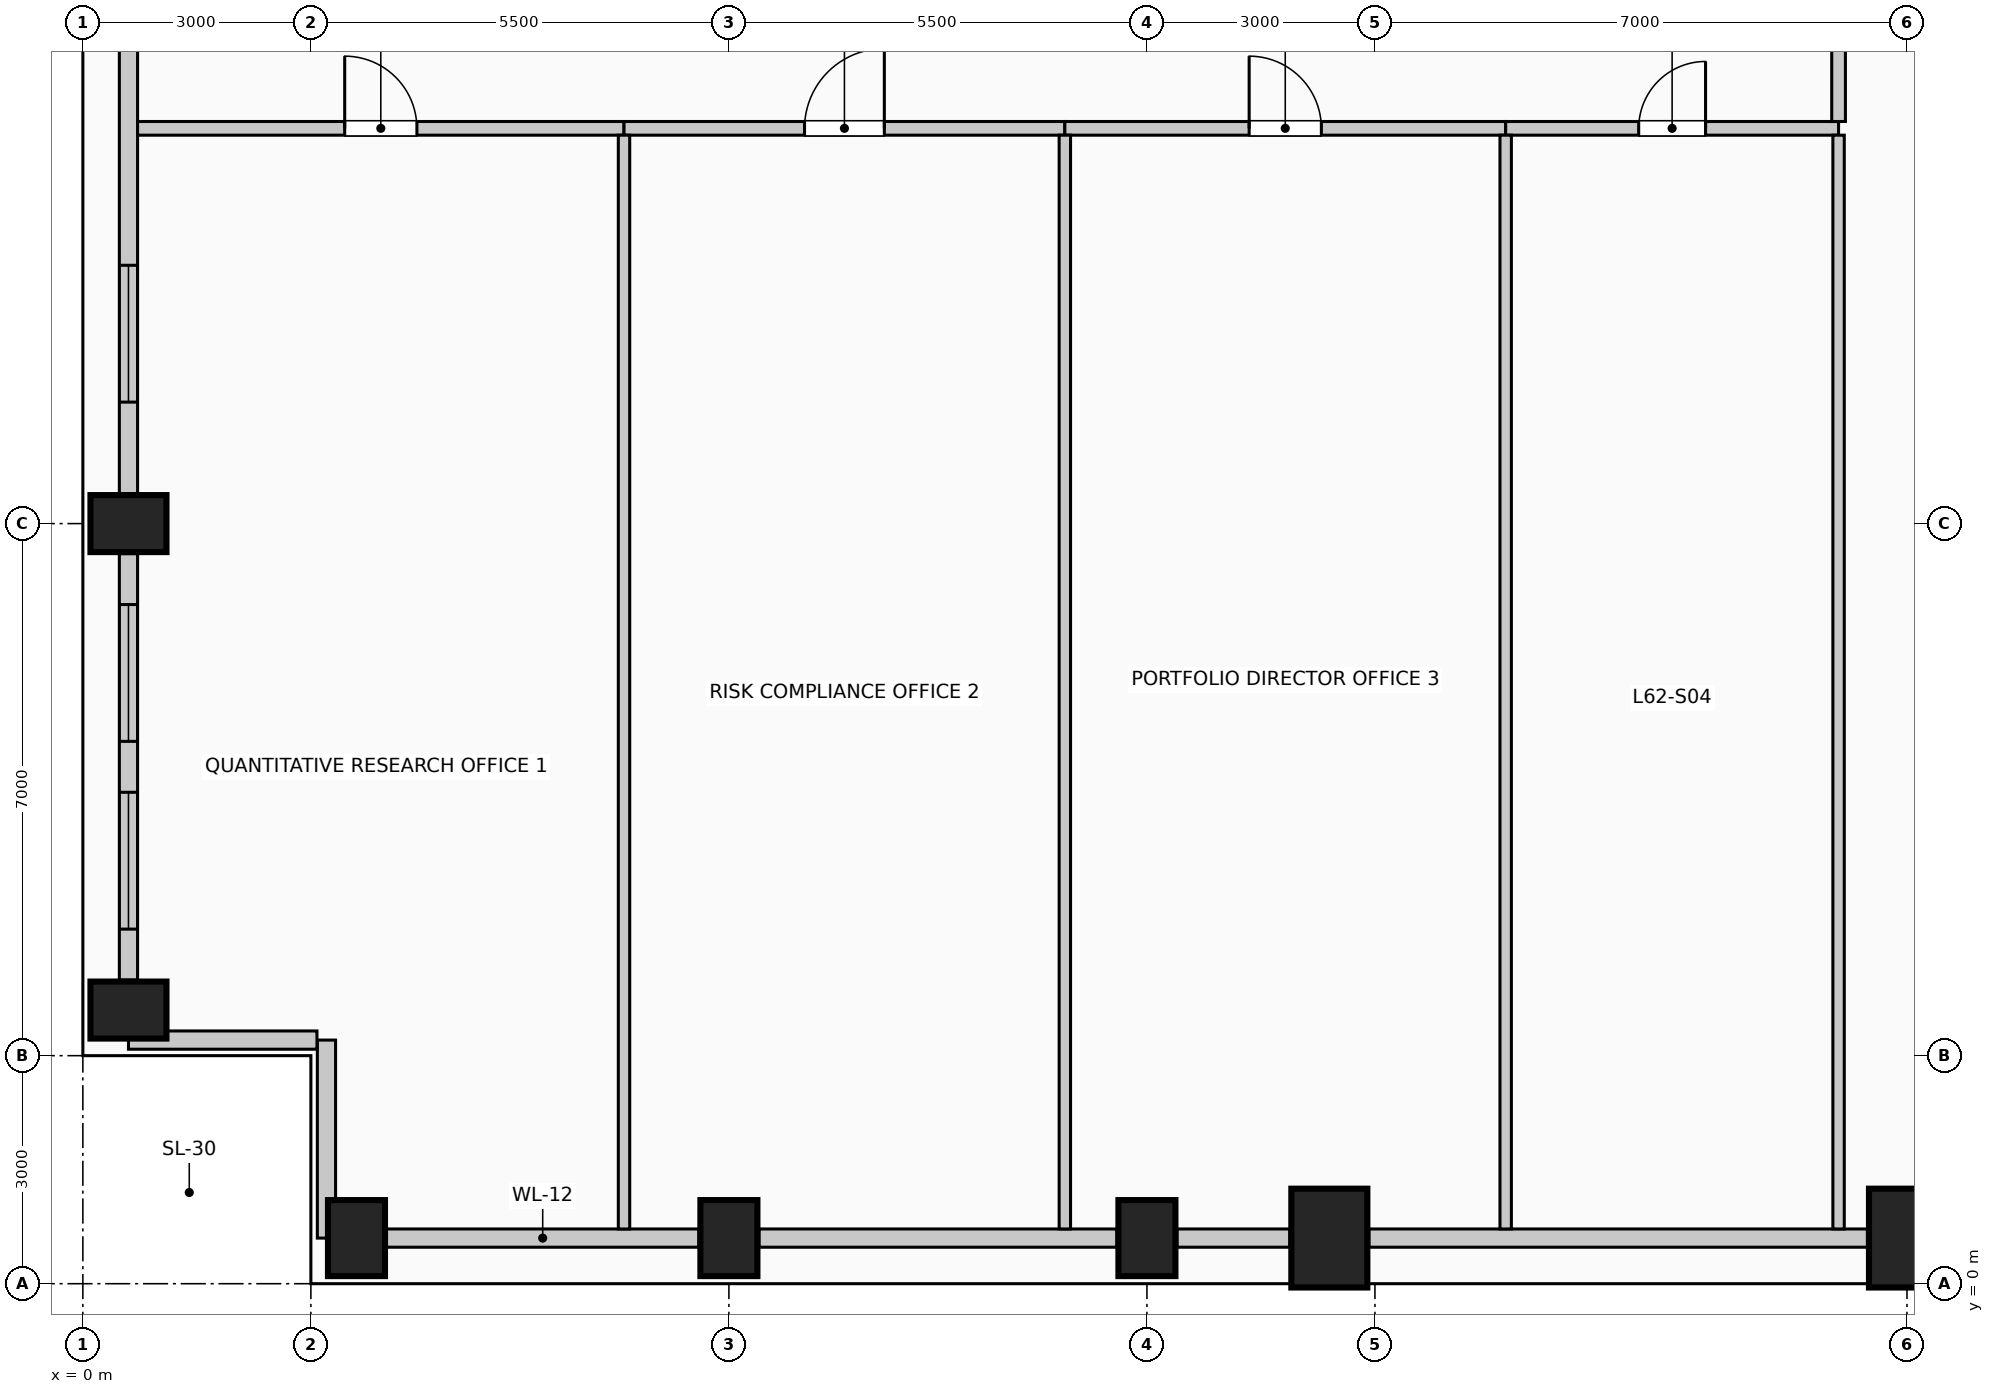
"""IFC4 building model, lengths in metres.
Left out: names, types, materials, properties, quantities, classifications, styles, units other than length and angle.
Written with IfcOpenShell. Run it as: python <this file> out.ifc"""

import sys

from ifc_helpers import new_model, si_unit, direction, frame, frame_2d, origin, origin_2d, place, context, subcontext, project, spatial, rectangle, extrude, element, fill, save


model = new_model("IFC4")
c1 = context("Model", 3, precision=1e-05, world=origin(), true_north=direction((0.0, 1.0)))
c2 = subcontext(c1, "Body", "Model", "MODEL_VIEW")
j1 = project(units=[si_unit("LENGTHUNIT", "METRE"), si_unit("PLANEANGLEUNIT", "RADIAN")], contexts=[c1])
p1 = place(None, origin())
s1 = spatial("IfcSite", under=j1, at=p1, CompositionType="ELEMENT")
p2 = place(p1, origin())
s2 = spatial("IfcBuilding", under=s1, at=p2, CompositionType="ELEMENT")
p3 = place(p2, frame((0.0, 0.0, 256.6)))
s3 = spatial("IfcBuildingStorey", under=s2, at=p3, CompositionType="ELEMENT", Elevation=256.6)
for number, where, z_axis, x_axis in (
    (1, (3.6, 0.6, 0.0), (0.0, 0.0, 1.0), (1.0, 0.0, 0.0)),
    (2, (8.5, 0.6, 0.0), (0.0, 0.0, 1.0), (1.0, 0.0, 0.0)),
    (3, (14.0, 0.6, 0.0), (0.0, 0.0, 1.0), (1.0, 0.0, 0.0)),
):
    element("IfcColumn", number, at=place(p3, frame(where, z_axis=z_axis, x_axis=x_axis)), inside=s3, PredefinedType="COLUMN", context=c2, shape_type="SweptSolid", body=[
        extrude(rectangle(XDim=0.75, YDim=1.0, at=origin_2d()), origin(), (0.0, 0.0, 1.0), 4.0),
    ])
for number, where, z_axis, x_axis in (
    (4, (16.4, 0.6, 0.0), (0.0, 0.0, 1.0), (1.0, 0.0, 0.0)),
    (5, (24.0, 0.6, 0.0), (0.0, 0.0, 1.0), (1.0, 0.0, 0.0)),
):
    element("IfcColumn", number, at=place(p3, frame(where, z_axis=z_axis, x_axis=x_axis)), inside=s3, PredefinedType="COLUMN", context=c2, shape_type="SweptSolid", body=[
        extrude(rectangle(XDim=1.0, YDim=1.3, at=origin_2d()), origin(), (0.0, 0.0, 1.0), 4.0),
    ])
for number, where, z_axis, x_axis in (
    (6, (0.6, 3.6, 0.0), (0.0, 0.0, 1.0), (0.0, 1.0, 0.0)),
    (7, (0.6, 10.0, 0.0), (0.0, 0.0, 1.0), (0.0, 1.0, 0.0)),
):
    element("IfcColumn", number, at=place(p3, frame(where, z_axis=z_axis, x_axis=x_axis)), inside=s3, PredefinedType="COLUMN", context=c2, shape_type="SweptSolid", body=[
        extrude(rectangle(XDim=0.75, YDim=1.0, at=origin_2d()), origin(), (0.0, 0.0, 1.0), 4.0),
    ])
p4 = place(p3, frame((8.105, 0.6, 0.0), z_axis=(0.0, 0.0, 1.0), x_axis=(-1.0, 0.0, 0.0)))
e8 = element("IfcWall", 8, at=p4, inside=s3, PredefinedType="SOLIDWALL", context=c2, shape_type="SweptSolid", body=[
    extrude(rectangle(XDim=4.11, YDim=0.24, at=frame_2d((2.055, 0.0))), origin(), (0.0, 0.0, 1.0), 3.0),
])
p5 = place(p3, frame((13.605, 0.6, 0.0), z_axis=(0.0, 0.0, 1.0), x_axis=(-1.0, 0.0, 0.0)))
e9 = element("IfcWall", 9, at=p5, inside=s3, PredefinedType="SOLIDWALL", context=c2, shape_type="SweptSolid", body=[
    extrude(rectangle(XDim=4.71, YDim=0.24, at=frame_2d((2.355, 0.0))), origin(), (0.0, 0.0, 1.0), 3.0),
])
p6 = place(p3, frame((15.88, 0.6, 0.0), z_axis=(0.0, 0.0, 1.0), x_axis=(-1.0, 0.0, 0.0)))
e10 = element("IfcWall", 10, at=p6, inside=s3, PredefinedType="SOLIDWALL", context=c2, shape_type="SweptSolid", body=[
    extrude(rectangle(XDim=1.485, YDim=0.24, at=frame_2d((0.742, 0.0))), origin(), (0.0, 0.0, 1.0), 3.0),
])
p7 = place(p3, frame((23.48, 0.6, 0.0), z_axis=(0.0, 0.0, 1.0), x_axis=(-1.0, 0.0, 0.0)))
e11 = element("IfcWall", 11, at=p7, inside=s3, PredefinedType="SOLIDWALL", context=c2, shape_type="SweptSolid", body=[
    extrude(rectangle(XDim=6.56, YDim=0.24, at=frame_2d((3.28, 0.0))), origin(), (0.0, 0.0, 1.0), 3.0),
])
p8 = place(p3, frame((0.6, 3.995, 0.0), z_axis=(0.0, 0.0, 1.0), x_axis=(0.0, 1.0, 0.0)))
e12 = element("IfcWall", 12, at=p8, inside=s3, PredefinedType="SOLIDWALL", context=c2, shape_type="SweptSolid", body=[
    extrude(rectangle(XDim=5.61, YDim=0.24, at=frame_2d((2.805, 0.0))), origin(), (0.0, 0.0, 1.0), 3.0),
])
p9 = place(p8, frame((0.67, 0.0, 0.42)))
e13 = element("IfcOpeningElement", 13, at=p9, cuts=e12, PredefinedType="OPENING", context=c2, shape_type="SweptSolid", body=[
    extrude(rectangle(XDim=1.8, YDim=2.2, at=frame_2d((0.9, 1.1))), frame((0.0, 0.13, 0.0), z_axis=(0.0, -1.0, 0.0), x_axis=(1.0, 0.0, 0.0)), (0.0, 0.0, 1.0), 0.26),
])
p10 = place(p8, frame((3.14, 0.0, 0.42)))
e14 = element("IfcOpeningElement", 14, at=p10, cuts=e12, PredefinedType="OPENING", context=c2, shape_type="SweptSolid", body=[
    extrude(rectangle(XDim=1.8, YDim=2.2, at=frame_2d((0.9, 1.1))), frame((0.0, 0.13, 0.0), z_axis=(0.0, -1.0, 0.0), x_axis=(1.0, 0.0, 0.0)), (0.0, 0.0, 1.0), 0.26),
])
p11 = place(p3, frame((0.6, 10.395, 0.0), z_axis=(0.0, 0.0, 1.0), x_axis=(0.0, 1.0, 0.0)))
e15 = element("IfcWall", 15, at=p11, inside=s3, PredefinedType="SOLIDWALL", context=c2, shape_type="SweptSolid", body=[
    extrude(rectangle(XDim=7.21, YDim=0.24, at=frame_2d((3.605, 0.0))), origin(), (0.0, 0.0, 1.0), 3.0),
])
p12 = place(p11, frame((1.203, 0.0, 0.42)))
e16 = element("IfcOpeningElement", 16, at=p12, cuts=e15, PredefinedType="OPENING", context=c2, shape_type="SweptSolid", body=[
    extrude(rectangle(XDim=1.8, YDim=2.2, at=frame_2d((0.9, 1.1))), frame((0.0, 0.13, 0.0), z_axis=(0.0, -1.0, 0.0), x_axis=(1.0, 0.0, 0.0)), (0.0, 0.0, 1.0), 0.26),
])
p13 = place(p3, frame((3.205, 0.6, 0.0), z_axis=(0.0, 0.0, 1.0), x_axis=(0.0, 1.0, 0.0)))
e17 = element("IfcWall", 17, at=p13, inside=s3, PredefinedType="SOLIDWALL", context=c2, shape_type="SweptSolid", body=[
    extrude(rectangle(XDim=2.605, YDim=0.24, at=frame_2d((1.302, 0.0))), origin(), (0.0, 0.0, 1.0), 3.75),
])
p14 = place(p3, frame((3.08, 3.205, 0.0), z_axis=(0.0, 0.0, 1.0), x_axis=(-1.0, 0.0, 0.0)))
e18 = element("IfcWall", 18, at=p14, inside=s3, PredefinedType="SOLIDWALL", context=c2, shape_type="SweptSolid", body=[
    extrude(rectangle(XDim=2.48, YDim=0.24, at=frame_2d((1.24, 0.0))), origin(), (0.0, 0.0, 1.0), 3.75),
])
p15 = place(p3, frame((0.72, 15.2, 0.0), z_axis=(0.0, 0.0, 1.0), x_axis=(1.0, 0.0, 0.0)))
e19 = element("IfcWall", 19, at=p15, inside=s3, PredefinedType="PARTITIONING", context=c2, shape_type="SweptSolid", body=[
    extrude(rectangle(XDim=6.4, YDim=0.18, at=frame_2d((3.2, 0.0))), origin(), (0.0, 0.0, 1.0), 3.75),
])
p16 = place(p15, frame((2.725, 0.0, 0.0)))
e20 = element("IfcOpeningElement", 20, at=p16, cuts=e19, PredefinedType="OPENING", context=c2, shape_type="SweptSolid", body=[
    extrude(rectangle(XDim=0.95, YDim=2.15, at=frame_2d((0.475, 1.075))), frame((0.0, 0.1, 0.0), z_axis=(0.0, -1.0, 0.0), x_axis=(1.0, 0.0, 0.0)), (0.0, 0.0, 1.0), 0.2),
])
p17 = place(p3, frame((7.12, 15.2, 0.0), z_axis=(0.0, 0.0, 1.0), x_axis=(1.0, 0.0, 0.0)))
e21 = element("IfcWall", 21, at=p17, inside=s3, PredefinedType="PARTITIONING", context=c2, shape_type="SweptSolid", body=[
    extrude(rectangle(XDim=5.8, YDim=0.18, at=frame_2d((2.9, 0.0))), origin(), (0.0, 0.0, 1.0), 3.75),
])
p18 = place(p17, frame((2.375, 0.0, 0.0)))
e22 = element("IfcOpeningElement", 22, at=p18, cuts=e21, PredefinedType="OPENING", context=c2, shape_type="SweptSolid", body=[
    extrude(rectangle(XDim=1.05, YDim=2.15, at=frame_2d((0.525, 1.075))), frame((0.0, 0.1, 0.0), z_axis=(0.0, -1.0, 0.0), x_axis=(1.0, 0.0, 0.0)), (0.0, 0.0, 1.0), 0.2),
])
p19 = place(p3, frame((12.92, 15.2, 0.0), z_axis=(0.0, 0.0, 1.0), x_axis=(1.0, 0.0, 0.0)))
e23 = element("IfcWall", 23, at=p19, inside=s3, PredefinedType="PARTITIONING", context=c2, shape_type="SweptSolid", body=[
    extrude(rectangle(XDim=5.8, YDim=0.18, at=frame_2d((2.9, 0.0))), origin(), (0.0, 0.0, 1.0), 3.75),
])
p20 = place(p19, frame((2.425, 0.0, 0.0)))
e24 = element("IfcOpeningElement", 24, at=p20, cuts=e23, PredefinedType="OPENING", context=c2, shape_type="SweptSolid", body=[
    extrude(rectangle(XDim=0.95, YDim=2.15, at=frame_2d((0.475, 1.075))), frame((0.0, 0.1, 0.0), z_axis=(0.0, -1.0, 0.0), x_axis=(1.0, 0.0, 0.0)), (0.0, 0.0, 1.0), 0.2),
])
p21 = place(p3, frame((18.72, 15.2, 0.0), z_axis=(0.0, 0.0, 1.0), x_axis=(1.0, 0.0, 0.0)))
e25 = element("IfcWall", 25, at=p21, inside=s3, PredefinedType="PARTITIONING", context=c2, shape_type="SweptSolid", body=[
    extrude(rectangle(XDim=4.38, YDim=0.18, at=frame_2d((2.19, 0.0))), origin(), (0.0, 0.0, 1.0), 3.75),
])
p22 = place(p21, frame((1.75, 0.0, 0.0)))
e26 = element("IfcOpeningElement", 26, at=p22, cuts=e25, PredefinedType="OPENING", context=c2, shape_type="SweptSolid", body=[
    extrude(rectangle(XDim=0.88, YDim=2.1, at=frame_2d((0.44, 1.05))), frame((0.0, 0.1, 0.0), z_axis=(0.0, -1.0, 0.0), x_axis=(1.0, 0.0, 0.0)), (0.0, 0.0, 1.0), 0.2),
])
for number, where, z_axis, x_axis in (
    (27, (7.12, 0.72, 0.0), (0.0, 0.0, 1.0), (0.0, 1.0, 0.0)),
    (28, (12.92, 0.72, 0.0), (0.0, 0.0, 1.0), (0.0, 1.0, 0.0)),
    (29, (18.72, 0.72, 0.0), (0.0, 0.0, 1.0), (0.0, 1.0, 0.0)),
    (30, (23.1, 0.72, 0.0), (0.0, 0.0, 1.0), (0.0, 1.0, 0.0)),
):
    element("IfcWall", number, at=place(p3, frame(where, z_axis=z_axis, x_axis=x_axis)), inside=s3, PredefinedType="PARTITIONING", context=c2, shape_type="SweptSolid", body=[
        extrude(rectangle(XDim=14.39, YDim=0.15, at=frame_2d((7.195, 0.0))), origin(), (0.0, 0.0, 1.0), 3.75),
    ])
p23 = place(p3, frame((23.1, 15.29, 0.0), z_axis=(0.0, 0.0, 1.0), x_axis=(0.0, 1.0, 0.0)))
e31 = element("IfcWall", 31, at=p23, inside=s3, PredefinedType="PARTITIONING", context=c2, shape_type="SweptSolid", body=[
    extrude(rectangle(XDim=2.01, YDim=0.18, at=frame_2d((1.005, 0.0))), origin(), (0.0, 0.0, 1.0), 3.75),
])
p24 = place(p9, origin())
e32 = element("IfcWindow", 32, at=p24, inside=s3, PartitioningType="SINGLE_PANEL", PredefinedType="WINDOW", context=c2, shape_type="SweptSolid", body=[
    extrude(rectangle(XDim=1.8, YDim=2.2, at=frame_2d((0.9, 1.1))), frame((0.0, 0.03, 0.0), z_axis=(0.0, -1.0, 0.0), x_axis=(1.0, 0.0, 0.0)), (0.0, 0.0, 1.0), 0.06),
])
fill(e13, e32)
p25 = place(p10, origin())
e33 = element("IfcWindow", 33, at=p25, inside=s3, PartitioningType="SINGLE_PANEL", PredefinedType="WINDOW", context=c2, shape_type="SweptSolid", body=[
    extrude(rectangle(XDim=1.8, YDim=2.2, at=frame_2d((0.9, 1.1))), frame((0.0, 0.03, 0.0), z_axis=(0.0, -1.0, 0.0), x_axis=(1.0, 0.0, 0.0)), (0.0, 0.0, 1.0), 0.06),
])
fill(e14, e33)
p26 = place(p12, origin())
e34 = element("IfcWindow", 34, at=p26, inside=s3, PartitioningType="SINGLE_PANEL", PredefinedType="WINDOW", context=c2, shape_type="SweptSolid", body=[
    extrude(rectangle(XDim=1.8, YDim=2.2, at=frame_2d((0.9, 1.1))), frame((0.0, 0.03, 0.0), z_axis=(0.0, -1.0, 0.0), x_axis=(1.0, 0.0, 0.0)), (0.0, 0.0, 1.0), 0.06),
])
fill(e16, e34)
p27 = place(p16, origin())
e35 = element("IfcDoor", 35, at=p27, inside=s3, OperationType="SINGLE_SWING_LEFT", PredefinedType="DOOR", context=c2, shape_type="SweptSolid", body=[
    extrude(rectangle(XDim=0.95, YDim=2.15, at=frame_2d((0.475, 1.075))), frame((0.0, 0.025, 0.0), z_axis=(0.0, -1.0, 0.0), x_axis=(1.0, 0.0, 0.0)), (0.0, 0.0, 1.0), 0.05),
])
fill(e20, e35)
p28 = place(p18, origin())
e36 = element("IfcDoor", 36, at=p28, inside=s3, OperationType="SINGLE_SWING_RIGHT", PredefinedType="DOOR", context=c2, shape_type="SweptSolid", body=[
    extrude(rectangle(XDim=1.05, YDim=2.15, at=frame_2d((0.525, 1.075))), frame((0.0, 0.025, 0.0), z_axis=(0.0, -1.0, 0.0), x_axis=(1.0, 0.0, 0.0)), (0.0, 0.0, 1.0), 0.05),
])
fill(e22, e36)
p29 = place(p20, origin())
e37 = element("IfcDoor", 37, at=p29, inside=s3, OperationType="SINGLE_SWING_LEFT", PredefinedType="DOOR", context=c2, shape_type="SweptSolid", body=[
    extrude(rectangle(XDim=0.95, YDim=2.15, at=frame_2d((0.475, 1.075))), frame((0.0, 0.025, 0.0), z_axis=(0.0, -1.0, 0.0), x_axis=(1.0, 0.0, 0.0)), (0.0, 0.0, 1.0), 0.05),
])
fill(e24, e37)
p30 = place(p22, origin())
e38 = element("IfcDoor", 38, at=p30, inside=s3, OperationType="SINGLE_SWING_RIGHT", PredefinedType="DOOR", context=c2, shape_type="SweptSolid", body=[
    extrude(rectangle(XDim=0.88, YDim=2.1, at=frame_2d((0.44, 1.05))), frame((0.0, 0.025, 0.0), z_axis=(0.0, -1.0, 0.0), x_axis=(1.0, 0.0, 0.0)), (0.0, 0.0, 1.0), 0.05),
])
fill(e26, e38)
save(model, sys.argv[1])
